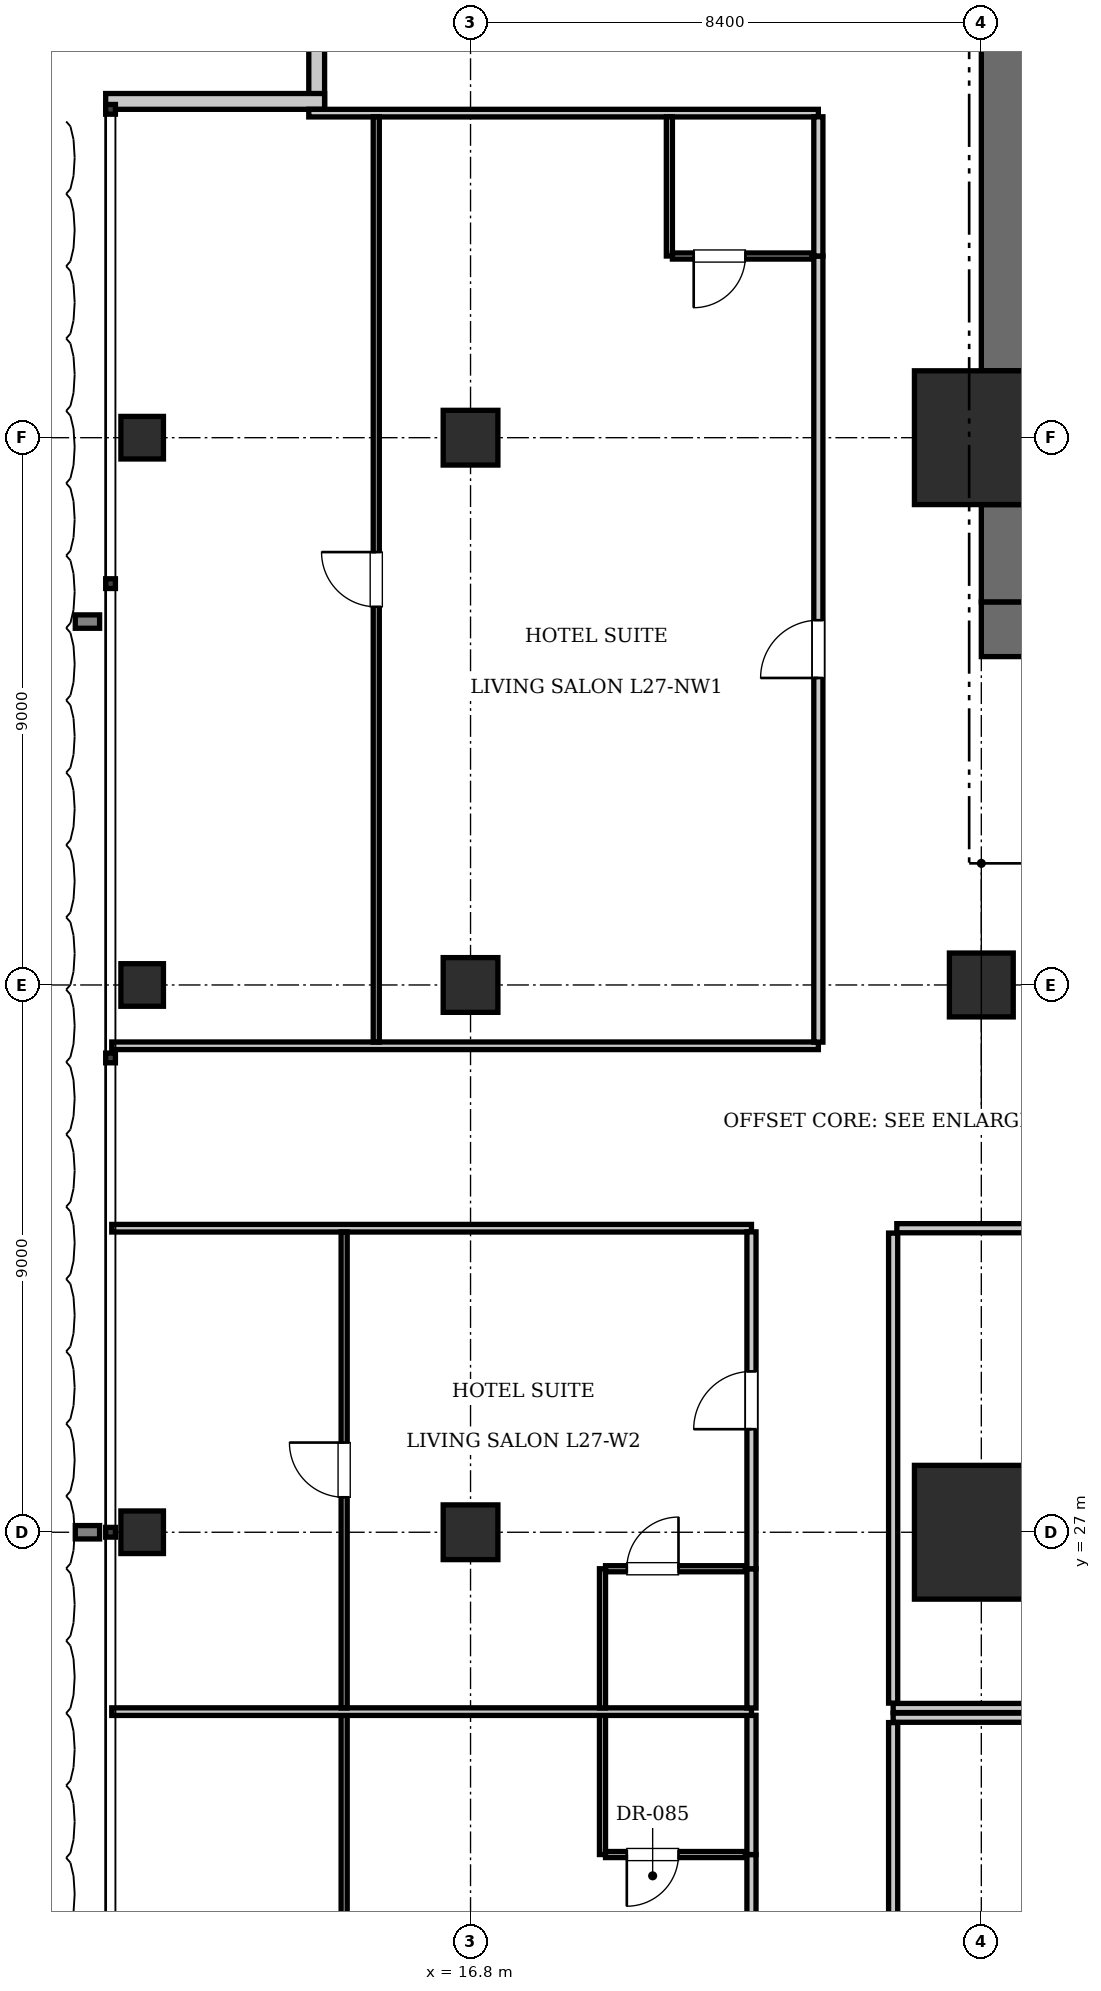
"""IFC4 building model, lengths in metres.
Left out: names, types, materials, properties, quantities, classifications, styles, units other than length and angle.
Written with IfcOpenShell. Run it as: python <this file> out.ifc"""

import sys

from ifc_helpers import new_model, si_unit, direction, frame, frame_2d, origin, origin_2d, place, context, subcontext, project, spatial, rectangle, i_section, extrude, element, fill, save


model = new_model("IFC4")
c1 = context("Model", 3, precision=1e-05, world=origin(), true_north=direction((0.0, 1.0)))
c2 = subcontext(c1, "Body", "Model", "MODEL_VIEW")
j1 = project(units=[si_unit("LENGTHUNIT", "METRE"), si_unit("PLANEANGLEUNIT", "RADIAN")], contexts=[c1])
p1 = place(None, origin())
s1 = spatial("IfcSite", under=j1, at=p1, CompositionType="ELEMENT")
p2 = place(p1, origin())
s2 = spatial("IfcBuilding", under=s1, at=p2, CompositionType="ELEMENT")
p3 = place(p2, frame((0.0, 0.0, 111.65)))
s3 = spatial("IfcBuildingStorey", under=s2, at=p3, CompositionType="ELEMENT", Elevation=111.65)
for number, where, z_axis, x_axis in (
    (1, (25.2, 27.0, 0.0), (0.0, 0.0, 1.0), (1.0, 0.0, 0.0)),
    (2, (25.2, 45.0, 0.0), (0.0, 0.0, 1.0), (1.0, 0.0, 0.0)),
):
    element("IfcColumn", number, at=place(p3, frame(where, z_axis=z_axis, x_axis=x_axis)), inside=s3, PredefinedType="COLUMN", context=c2, shape_type="SweptSolid", body=[
        extrude(rectangle(XDim=2.2, YDim=2.2, at=origin_2d()), origin(), (0.0, 0.0, 1.0), 3.85),
    ])
p4 = place(p3, frame((25.2, 41.85, 0.0), z_axis=(0.0, 0.0, 1.0), x_axis=(1.0, 0.0, 0.0)))
e3 = element("IfcWall", 3, at=p4, inside=s3, PredefinedType="SHEAR", context=c2, shape_type="SweptSolid", body=[
    extrude(rectangle(XDim=6.8, YDim=0.9, at=frame_2d((3.4, 0.0))), origin(), (0.0, 0.0, 1.0), 3.85),
])
p5 = place(p4, frame((1.65, 0.0, 0.0)))
e4 = element("IfcOpeningElement", 4, at=p5, cuts=e3, PredefinedType="OPENING", context=c2, shape_type="SweptSolid", body=[
    extrude(rectangle(XDim=1.15, YDim=2.15, at=frame_2d((0.575, 1.075))), frame((0.0, 0.46, 0.0), z_axis=(0.0, -1.0, 0.0), x_axis=(1.0, 0.0, 0.0)), (0.0, 0.0, 1.0), 0.92),
])
p6 = place(p4, frame((5.15, 0.0, 0.0)))
e5 = element("IfcOpeningElement", 5, at=p6, cuts=e3, PredefinedType="OPENING", context=c2, shape_type="SweptSolid", body=[
    extrude(rectangle(XDim=1.1, YDim=2.2, at=frame_2d((0.55, 1.1))), frame((0.0, 0.46, 0.0), z_axis=(0.0, -1.0, 0.0), x_axis=(1.0, 0.0, 0.0)), (0.0, 0.0, 1.0), 0.92),
])
p7 = place(p3, frame((25.65, 42.3, 0.0), z_axis=(0.0, 0.0, 1.0), x_axis=(0.0, 1.0, 0.0)))
e6 = element("IfcWall", 6, at=p7, inside=s3, PredefinedType="SHEAR", context=c2, shape_type="SweptSolid", body=[
    extrude(rectangle(XDim=1.6, YDim=0.9, at=frame_2d((0.8, 0.0))), origin(), (0.0, 0.0, 1.0), 3.85),
])
p8 = place(p3, frame((25.65, 46.1, 0.0), z_axis=(0.0, 0.0, 1.0), x_axis=(0.0, 1.0, 0.0)))
e7 = element("IfcWall", 7, at=p8, inside=s3, PredefinedType="SHEAR", context=c2, shape_type="SweptSolid", body=[
    extrude(rectangle(XDim=7.0, YDim=0.9, at=frame_2d((3.5, 0.0))), origin(), (0.0, 0.0, 1.0), 3.85),
])
p9 = place(p3, frame((25.2, 36.0, 0.0), z_axis=(0.0, 0.0, 1.0), x_axis=(1.0, 0.0, 0.0)))
e8 = element("IfcColumn", 8, at=p9, inside=s3, PredefinedType="COLUMN", context=c2, shape_type="SweptSolid", body=[
    extrude(rectangle(XDim=1.05, YDim=1.05, at=origin_2d()), origin(), (0.0, 0.0, 1.0), 3.85),
])
for number, where, z_axis, x_axis in (
    (9, (16.8, 27.0, 0.0), (0.0, 0.0, 1.0), (1.0, 0.0, 0.0)),
    (10, (16.8, 36.0, 0.0), (0.0, 0.0, 1.0), (1.0, 0.0, 0.0)),
    (11, (16.8, 45.0, 0.0), (0.0, 0.0, 1.0), (1.0, 0.0, 0.0)),
):
    element("IfcColumn", number, at=place(p3, frame(where, z_axis=z_axis, x_axis=x_axis)), inside=s3, PredefinedType="COLUMN", context=c2, shape_type="SweptSolid", body=[
        extrude(rectangle(XDim=0.9, YDim=0.9, at=origin_2d()), origin(), (0.0, 0.0, 1.0), 3.85),
    ])
for number, where, z_axis, x_axis in (
    (12, (11.4, 27.0, 0.0), (0.0, 0.0, 1.0), (1.0, 0.0, 0.0)),
    (13, (11.4, 36.0, 0.0), (0.0, 0.0, 1.0), (1.0, 0.0, 0.0)),
    (14, (11.4, 45.0, 0.0), (0.0, 0.0, 1.0), (1.0, 0.0, 0.0)),
):
    element("IfcColumn", number, at=place(p3, frame(where, z_axis=z_axis, x_axis=x_axis)), inside=s3, PredefinedType="COLUMN", context=c2, shape_type="SweptSolid", body=[
        extrude(i_section(OverallWidth=0.7, OverallDepth=0.7, WebThickness=0.028, FlangeThickness=0.044, at=origin_2d()), origin(), (0.0, 0.0, 1.0), 3.85),
    ])
p10 = place(p3, frame((14.27, 50.4, 0.0), z_axis=(0.0, 0.0, 1.0), x_axis=(0.0, 1.0, 0.0)))
e15 = element("IfcWall", 15, at=p10, inside=s3, PredefinedType="SOLIDWALL", context=c2, shape_type="SweptSolid", body=[
    extrude(rectangle(XDim=3.6, YDim=0.26, at=frame_2d((1.8, 0.0))), origin(), (0.0, 0.0, 1.0), 3.55),
])
p11 = place(p3, frame((10.8, 50.53, 0.0), z_axis=(0.0, 0.0, 1.0), x_axis=(1.0, 0.0, 0.0)))
e16 = element("IfcWall", 16, at=p11, inside=s3, PredefinedType="SOLIDWALL", context=c2, shape_type="SweptSolid", body=[
    extrude(rectangle(XDim=3.6, YDim=0.26, at=frame_2d((1.8, 0.0))), origin(), (0.0, 0.0, 1.0), 3.55),
])
p12 = place(p3, frame((23.75, 24.11, 0.0), z_axis=(0.0, 0.0, 1.0), x_axis=(1.0, 0.0, 0.0)))
e17 = element("IfcWall", 17, at=p12, inside=s3, PredefinedType="PARTITIONING", context=c2, shape_type="SweptSolid", body=[
    extrude(rectangle(XDim=28.1, YDim=0.15, at=frame_2d((14.05, 0.0))), origin(), (0.0, 0.0, 1.0), 3.55),
])
p13 = place(p3, frame((23.75, 24.19, 0.0), z_axis=(0.0, 0.0, 1.0), x_axis=(0.0, 1.0, 0.0)))
e18 = element("IfcWall", 18, at=p13, inside=s3, PredefinedType="PARTITIONING", context=c2, shape_type="SweptSolid", body=[
    extrude(rectangle(XDim=7.73, YDim=0.15, at=frame_2d((3.865, 0.0))), origin(), (0.0, 0.0, 1.0), 3.55),
])
p14 = place(p3, frame((23.81, 32.0, 0.0), z_axis=(0.0, 0.0, 1.0), x_axis=(1.0, 0.0, 0.0)))
e19 = element("IfcWall", 19, at=p14, inside=s3, PredefinedType="PARTITIONING", context=c2, shape_type="SweptSolid", body=[
    extrude(rectangle(XDim=6.373, YDim=0.15, at=frame_2d((3.187, 0.0))), origin(), (0.0, 0.0, 1.0), 3.55),
])
p15 = place(p14, frame((2.737, 0.0, 0.0)))
e20 = element("IfcOpeningElement", 20, at=p15, cuts=e19, PredefinedType="OPENING", context=c2, shape_type="SweptSolid", body=[
    extrude(rectangle(XDim=0.9, YDim=2.1, at=frame_2d((0.45, 1.05))), frame((0.0, 0.085, 0.0), z_axis=(0.0, -1.0, 0.0), x_axis=(1.0, 0.0, 0.0)), (0.0, 0.0, 1.0), 0.17),
])
p16 = place(p3, frame((23.75, 23.95, 0.0), z_axis=(0.0, 0.0, 1.0), x_axis=(1.0, 0.0, 0.0)))
e21 = element("IfcWall", 21, at=p16, inside=s3, PredefinedType="PARTITIONING", context=c2, shape_type="SweptSolid", body=[
    extrude(rectangle(XDim=28.1, YDim=0.15, at=frame_2d((14.05, 0.0))), origin(), (0.0, 0.0, 1.0), 3.55),
])
p17 = place(p3, frame((23.75, 16.13, 0.0), z_axis=(0.0, 0.0, 1.0), x_axis=(0.0, 1.0, 0.0)))
e22 = element("IfcWall", 22, at=p17, inside=s3, PredefinedType="PARTITIONING", context=c2, shape_type="SweptSolid", body=[
    extrude(rectangle(XDim=7.74, YDim=0.15, at=frame_2d((3.87, 0.0))), origin(), (0.0, 0.0, 1.0), 3.55),
])
p18 = place(p3, frame((10.9, 32.0, 0.0), z_axis=(0.0, 0.0, 1.0), x_axis=(1.0, 0.0, 0.0)))
e23 = element("IfcWall", 23, at=p18, inside=s3, PredefinedType="PARTITIONING", context=c2, shape_type="SweptSolid", body=[
    extrude(rectangle(XDim=10.52, YDim=0.125, at=frame_2d((5.26, 0.0))), origin(), (0.0, 0.0, 1.0), 3.55),
])
p19 = place(p3, frame((21.42, 16.16, 0.0), z_axis=(0.0, 0.0, 1.0), x_axis=(0.0, 1.0, 0.0)))
e24 = element("IfcWall", 24, at=p19, inside=s3, PredefinedType="PARTITIONING", context=c2, shape_type="SweptSolid", body=[
    extrude(rectangle(XDim=5.54, YDim=0.15, at=frame_2d((2.77, 0.0))), origin(), (0.0, 0.0, 1.0), 3.55),
])
p20 = place(p19, frame((2.295, 0.0, 0.0)))
e25 = element("IfcOpeningElement", 25, at=p20, cuts=e24, PredefinedType="OPENING", context=c2, shape_type="SweptSolid", body=[
    extrude(rectangle(XDim=0.95, YDim=2.15, at=frame_2d((0.475, 1.075))), frame((0.0, 0.085, 0.0), z_axis=(0.0, -1.0, 0.0), x_axis=(1.0, 0.0, 0.0)), (0.0, 0.0, 1.0), 0.17),
])
p21 = place(p3, frame((21.42, 21.7, 0.0), z_axis=(0.0, 0.0, 1.0), x_axis=(0.0, 1.0, 0.0)))
e26 = element("IfcWall", 26, at=p21, inside=s3, PredefinedType="PARTITIONING", context=c2, shape_type="SweptSolid", body=[
    extrude(rectangle(XDim=2.29, YDim=0.15, at=frame_2d((1.145, 0.0))), origin(), (0.0, 0.0, 1.0), 3.55),
])
p22 = place(p3, frame((18.97, 21.7, 0.0), z_axis=(0.0, 0.0, 1.0), x_axis=(0.0, 1.0, 0.0)))
e27 = element("IfcWall", 27, at=p22, inside=s3, PredefinedType="PARTITIONING", context=c2, shape_type="SweptSolid", body=[
    extrude(rectangle(XDim=2.29, YDim=0.1, at=frame_2d((1.145, 0.0))), origin(), (0.0, 0.0, 1.0), 3.55),
])
p23 = place(p3, frame((19.02, 21.7, 0.0), z_axis=(0.0, 0.0, 1.0), x_axis=(1.0, 0.0, 0.0)))
e28 = element("IfcWall", 28, at=p23, inside=s3, PredefinedType="PARTITIONING", context=c2, shape_type="SweptSolid", body=[
    extrude(rectangle(XDim=2.3, YDim=0.1, at=frame_2d((1.15, 0.0))), origin(), (0.0, 0.0, 1.0), 3.55),
])
p24 = place(p23, frame((0.35, 0.0, 0.0)))
e29 = element("IfcOpeningElement", 29, at=p24, cuts=e28, PredefinedType="OPENING", context=c2, shape_type="SweptSolid", body=[
    extrude(rectangle(XDim=0.85, YDim=2.1, at=frame_2d((0.425, 1.05))), frame((0.0, 0.06, 0.0), z_axis=(0.0, -1.0, 0.0), x_axis=(1.0, 0.0, 0.0)), (0.0, 0.0, 1.0), 0.12),
])
p25 = place(p3, frame((14.722, 16.16, 0.0), z_axis=(0.0, 0.0, 1.0), x_axis=(0.0, 1.0, 0.0)))
e30 = element("IfcWall", 30, at=p25, inside=s3, PredefinedType="PARTITIONING", context=c2, shape_type="SweptSolid", body=[
    extrude(rectangle(XDim=7.83, YDim=0.1, at=frame_2d((3.915, 0.0))), origin(), (0.0, 0.0, 1.0), 3.55),
])
p26 = place(p25, frame((3.465, 0.0, 0.0)))
e31 = element("IfcOpeningElement", 31, at=p26, cuts=e30, PredefinedType="OPENING", context=c2, shape_type="SweptSolid", body=[
    extrude(rectangle(XDim=0.9, YDim=2.1, at=frame_2d((0.45, 1.05))), frame((0.0, 0.06, 0.0), z_axis=(0.0, -1.0, 0.0), x_axis=(1.0, 0.0, 0.0)), (0.0, 0.0, 1.0), 0.12),
])
p27 = place(p3, frame((10.9, 24.05, 0.0), z_axis=(0.0, 0.0, 1.0), x_axis=(1.0, 0.0, 0.0)))
e32 = element("IfcWall", 32, at=p27, inside=s3, PredefinedType="PARTITIONING", context=c2, shape_type="SweptSolid", body=[
    extrude(rectangle(XDim=10.52, YDim=0.125, at=frame_2d((5.26, 0.0))), origin(), (0.0, 0.0, 1.0), 3.55),
])
p28 = place(p3, frame((21.42, 24.11, 0.0), z_axis=(0.0, 0.0, 1.0), x_axis=(0.0, 1.0, 0.0)))
e33 = element("IfcWall", 33, at=p28, inside=s3, PredefinedType="PARTITIONING", context=c2, shape_type="SweptSolid", body=[
    extrude(rectangle(XDim=2.29, YDim=0.15, at=frame_2d((1.145, 0.0))), origin(), (0.0, 0.0, 1.0), 3.55),
])
p29 = place(p3, frame((21.42, 26.4, 0.0), z_axis=(0.0, 0.0, 1.0), x_axis=(0.0, 1.0, 0.0)))
e34 = element("IfcWall", 34, at=p29, inside=s3, PredefinedType="PARTITIONING", context=c2, shape_type="SweptSolid", body=[
    extrude(rectangle(XDim=5.54, YDim=0.15, at=frame_2d((2.77, 0.0))), origin(), (0.0, 0.0, 1.0), 3.55),
])
p30 = place(p29, frame((2.295, 0.0, 0.0)))
e35 = element("IfcOpeningElement", 35, at=p30, cuts=e34, PredefinedType="OPENING", context=c2, shape_type="SweptSolid", body=[
    extrude(rectangle(XDim=0.95, YDim=2.15, at=frame_2d((0.475, 1.075))), frame((0.0, 0.085, 0.0), z_axis=(0.0, -1.0, 0.0), x_axis=(1.0, 0.0, 0.0)), (0.0, 0.0, 1.0), 0.17),
])
p31 = place(p3, frame((18.97, 24.11, 0.0), z_axis=(0.0, 0.0, 1.0), x_axis=(0.0, 1.0, 0.0)))
e36 = element("IfcWall", 36, at=p31, inside=s3, PredefinedType="PARTITIONING", context=c2, shape_type="SweptSolid", body=[
    extrude(rectangle(XDim=2.29, YDim=0.1, at=frame_2d((1.145, 0.0))), origin(), (0.0, 0.0, 1.0), 3.55),
])
p32 = place(p3, frame((19.02, 26.4, 0.0), z_axis=(0.0, 0.0, 1.0), x_axis=(1.0, 0.0, 0.0)))
e37 = element("IfcWall", 37, at=p32, inside=s3, PredefinedType="PARTITIONING", context=c2, shape_type="SweptSolid", body=[
    extrude(rectangle(XDim=2.3, YDim=0.1, at=frame_2d((1.15, 0.0))), origin(), (0.0, 0.0, 1.0), 3.55),
])
p33 = place(p32, frame((0.35, 0.0, 0.0)))
e38 = element("IfcOpeningElement", 38, at=p33, cuts=e37, PredefinedType="OPENING", context=c2, shape_type="SweptSolid", body=[
    extrude(rectangle(XDim=0.85, YDim=2.1, at=frame_2d((0.425, 1.05))), frame((0.0, 0.06, 0.0), z_axis=(0.0, -1.0, 0.0), x_axis=(1.0, 0.0, 0.0)), (0.0, 0.0, 1.0), 0.12),
])
p34 = place(p3, frame((14.722, 24.11, 0.0), z_axis=(0.0, 0.0, 1.0), x_axis=(0.0, 1.0, 0.0)))
e39 = element("IfcWall", 39, at=p34, inside=s3, PredefinedType="PARTITIONING", context=c2, shape_type="SweptSolid", body=[
    extrude(rectangle(XDim=7.83, YDim=0.1, at=frame_2d((3.915, 0.0))), origin(), (0.0, 0.0, 1.0), 3.55),
])
p35 = place(p34, frame((3.465, 0.0, 0.0)))
e40 = element("IfcOpeningElement", 40, at=p35, cuts=e39, PredefinedType="OPENING", context=c2, shape_type="SweptSolid", body=[
    extrude(rectangle(XDim=0.9, YDim=2.1, at=frame_2d((0.45, 1.05))), frame((0.0, 0.06, 0.0), z_axis=(0.0, -1.0, 0.0), x_axis=(1.0, 0.0, 0.0)), (0.0, 0.0, 1.0), 0.12),
])
p36 = place(p3, frame((10.9, 35.0, 0.0), z_axis=(0.0, 0.0, 1.0), x_axis=(1.0, 0.0, 0.0)))
e41 = element("IfcWall", 41, at=p36, inside=s3, PredefinedType="PARTITIONING", context=c2, shape_type="SweptSolid", body=[
    extrude(rectangle(XDim=11.62, YDim=0.125, at=frame_2d((5.81, 0.0))), origin(), (0.0, 0.0, 1.0), 3.55),
])
p37 = place(p3, frame((14.14, 50.337, 0.0), z_axis=(0.0, 0.0, 1.0), x_axis=(1.0, 0.0, 0.0)))
e42 = element("IfcWall", 42, at=p37, inside=s3, PredefinedType="PARTITIONING", context=c2, shape_type="SweptSolid", body=[
    extrude(rectangle(XDim=8.38, YDim=0.125, at=frame_2d((4.19, 0.0))), origin(), (0.0, 0.0, 1.0), 3.55),
])
p38 = place(p3, frame((22.52, 35.06, 0.0), z_axis=(0.0, 0.0, 1.0), x_axis=(0.0, 1.0, 0.0)))
e43 = element("IfcWall", 43, at=p38, inside=s3, PredefinedType="PARTITIONING", context=c2, shape_type="SweptSolid", body=[
    extrude(rectangle(XDim=12.927, YDim=0.15, at=frame_2d((6.464, 0.0))), origin(), (0.0, 0.0, 1.0), 3.55),
])
p39 = place(p38, frame((5.989, 0.0, 0.0)))
e44 = element("IfcOpeningElement", 44, at=p39, cuts=e43, PredefinedType="OPENING", context=c2, shape_type="SweptSolid", body=[
    extrude(rectangle(XDim=0.95, YDim=2.15, at=frame_2d((0.475, 1.075))), frame((0.0, 0.085, 0.0), z_axis=(0.0, -1.0, 0.0), x_axis=(1.0, 0.0, 0.0)), (0.0, 0.0, 1.0), 0.17),
])
p40 = place(p3, frame((22.52, 47.988, 0.0), z_axis=(0.0, 0.0, 1.0), x_axis=(0.0, 1.0, 0.0)))
e45 = element("IfcWall", 45, at=p40, inside=s3, PredefinedType="PARTITIONING", context=c2, shape_type="SweptSolid", body=[
    extrude(rectangle(XDim=2.29, YDim=0.15, at=frame_2d((1.145, 0.0))), origin(), (0.0, 0.0, 1.0), 3.55),
])
p41 = place(p3, frame((20.07, 47.988, 0.0), z_axis=(0.0, 0.0, 1.0), x_axis=(0.0, 1.0, 0.0)))
e46 = element("IfcWall", 46, at=p41, inside=s3, PredefinedType="PARTITIONING", context=c2, shape_type="SweptSolid", body=[
    extrude(rectangle(XDim=2.29, YDim=0.1, at=frame_2d((1.145, 0.0))), origin(), (0.0, 0.0, 1.0), 3.55),
])
p42 = place(p3, frame((20.12, 47.988, 0.0), z_axis=(0.0, 0.0, 1.0), x_axis=(1.0, 0.0, 0.0)))
e47 = element("IfcWall", 47, at=p42, inside=s3, PredefinedType="PARTITIONING", context=c2, shape_type="SweptSolid", body=[
    extrude(rectangle(XDim=2.3, YDim=0.1, at=frame_2d((1.15, 0.0))), origin(), (0.0, 0.0, 1.0), 3.55),
])
p43 = place(p42, frame((0.35, 0.0, 0.0)))
e48 = element("IfcOpeningElement", 48, at=p43, cuts=e47, PredefinedType="OPENING", context=c2, shape_type="SweptSolid", body=[
    extrude(rectangle(XDim=0.85, YDim=2.1, at=frame_2d((0.425, 1.05))), frame((0.0, 0.06, 0.0), z_axis=(0.0, -1.0, 0.0), x_axis=(1.0, 0.0, 0.0)), (0.0, 0.0, 1.0), 0.12),
])
p44 = place(p3, frame((15.25, 35.06, 0.0), z_axis=(0.0, 0.0, 1.0), x_axis=(0.0, 1.0, 0.0)))
e49 = element("IfcWall", 49, at=p44, inside=s3, PredefinedType="PARTITIONING", context=c2, shape_type="SweptSolid", body=[
    extrude(rectangle(XDim=15.218, YDim=0.1, at=frame_2d((7.609, 0.0))), origin(), (0.0, 0.0, 1.0), 3.55),
])
p45 = place(p44, frame((7.159, 0.0, 0.0)))
e50 = element("IfcOpeningElement", 50, at=p45, cuts=e49, PredefinedType="OPENING", context=c2, shape_type="SweptSolid", body=[
    extrude(rectangle(XDim=0.9, YDim=2.1, at=frame_2d((0.45, 1.05))), frame((0.0, 0.06, 0.0), z_axis=(0.0, -1.0, 0.0), x_axis=(1.0, 0.0, 0.0)), (0.0, 0.0, 1.0), 0.12),
])
p46 = place(p24, frame((0.85, 0.0, 0.0), z_axis=(0.0, 0.0, 1.0), x_axis=(-1.0, 0.0, 0.0)))
e51 = element("IfcDoor", 51, at=p46, inside=s3, OperationType="SINGLE_SWING_RIGHT", PredefinedType="DOOR", context=c2, shape_type="SweptSolid", body=[
    extrude(rectangle(XDim=0.85, YDim=2.1, at=frame_2d((0.425, 1.05))), frame((0.0, 0.025, 0.0), z_axis=(0.0, -1.0, 0.0), x_axis=(1.0, 0.0, 0.0)), (0.0, 0.0, 1.0), 0.05),
])
fill(e29, e51)
p47 = place(p33, origin())
e52 = element("IfcDoor", 52, at=p47, inside=s3, OperationType="SINGLE_SWING_RIGHT", PredefinedType="DOOR", context=c2, shape_type="SweptSolid", body=[
    extrude(rectangle(XDim=0.85, YDim=2.1, at=frame_2d((0.425, 1.05))), frame((0.0, 0.025, 0.0), z_axis=(0.0, -1.0, 0.0), x_axis=(1.0, 0.0, 0.0)), (0.0, 0.0, 1.0), 0.05),
])
fill(e38, e52)
p48 = place(p30, origin())
e53 = element("IfcDoor", 53, at=p48, inside=s3, OperationType="SINGLE_SWING_LEFT", PredefinedType="DOOR", context=c2, shape_type="SweptSolid", body=[
    extrude(rectangle(XDim=0.95, YDim=2.15, at=frame_2d((0.475, 1.075))), frame((0.0, 0.025, 0.0), z_axis=(0.0, -1.0, 0.0), x_axis=(1.0, 0.0, 0.0)), (0.0, 0.0, 1.0), 0.05),
])
fill(e35, e53)
p49 = place(p35, origin())
e54 = element("IfcDoor", 54, at=p49, inside=s3, OperationType="SINGLE_SWING_RIGHT", PredefinedType="DOOR", context=c2, shape_type="SweptSolid", body=[
    extrude(rectangle(XDim=0.9, YDim=2.1, at=frame_2d((0.45, 1.05))), frame((0.0, 0.025, 0.0), z_axis=(0.0, -1.0, 0.0), x_axis=(1.0, 0.0, 0.0)), (0.0, 0.0, 1.0), 0.05),
])
fill(e40, e54)
p50 = place(p43, frame((0.85, 0.0, 0.0), z_axis=(0.0, 0.0, 1.0), x_axis=(-1.0, 0.0, 0.0)))
e55 = element("IfcDoor", 55, at=p50, inside=s3, OperationType="SINGLE_SWING_RIGHT", PredefinedType="DOOR", context=c2, shape_type="SweptSolid", body=[
    extrude(rectangle(XDim=0.85, YDim=2.1, at=frame_2d((0.425, 1.05))), frame((0.0, 0.025, 0.0), z_axis=(0.0, -1.0, 0.0), x_axis=(1.0, 0.0, 0.0)), (0.0, 0.0, 1.0), 0.05),
])
fill(e48, e55)
p51 = place(p39, origin())
e56 = element("IfcDoor", 56, at=p51, inside=s3, OperationType="SINGLE_SWING_LEFT", PredefinedType="DOOR", context=c2, shape_type="SweptSolid", body=[
    extrude(rectangle(XDim=0.95, YDim=2.15, at=frame_2d((0.475, 1.075))), frame((0.0, 0.025, 0.0), z_axis=(0.0, -1.0, 0.0), x_axis=(1.0, 0.0, 0.0)), (0.0, 0.0, 1.0), 0.05),
])
fill(e44, e56)
p52 = place(p45, origin())
e57 = element("IfcDoor", 57, at=p52, inside=s3, OperationType="SINGLE_SWING_RIGHT", PredefinedType="DOOR", context=c2, shape_type="SweptSolid", body=[
    extrude(rectangle(XDim=0.9, YDim=2.1, at=frame_2d((0.45, 1.05))), frame((0.0, 0.025, 0.0), z_axis=(0.0, -1.0, 0.0), x_axis=(1.0, 0.0, 0.0)), (0.0, 0.0, 1.0), 0.05),
])
fill(e50, e57)
save(model, sys.argv[1])
